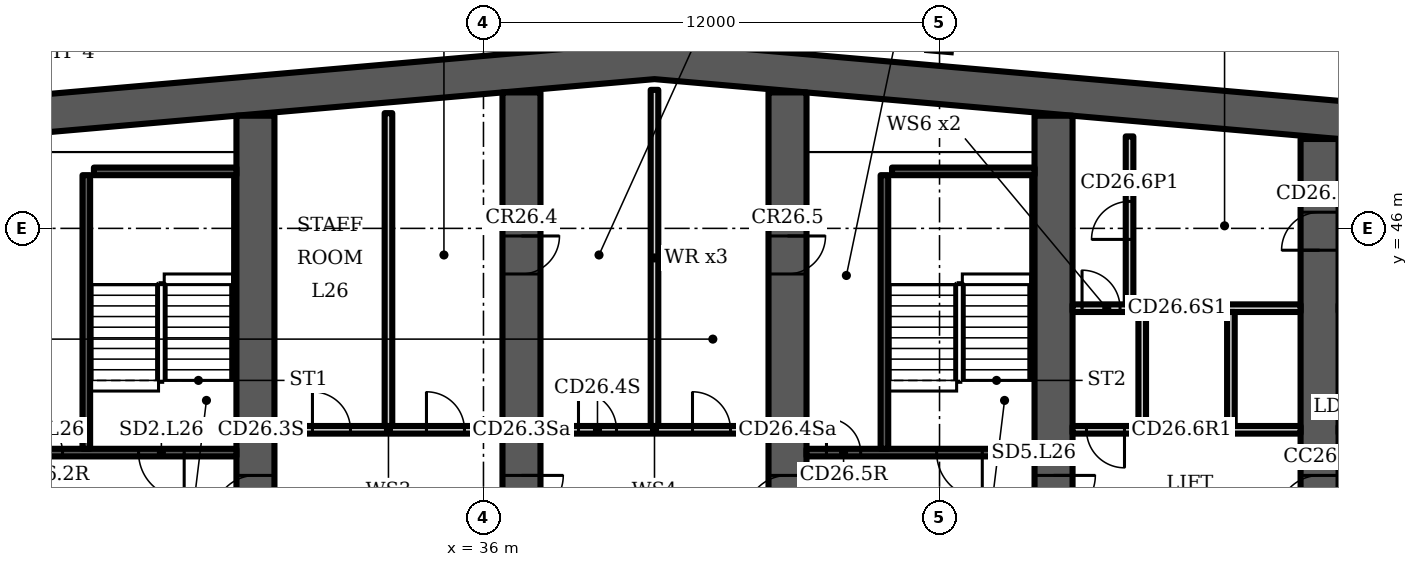
"""IFC4 building model, lengths in metres.
Left out: names, types, materials, properties, quantities, classifications, styles, units other than length and angle.
Written with IfcOpenShell. Run it as: python <this file> out.ifc"""

import sys

from ifc_helpers import new_model, si_unit, direction, frame, frame_2d, origin, origin_2d, place, context, subcontext, project, spatial, polyline, rectangle, i_section, outline, extrude, element, fill, save


model = new_model("IFC4")
c1 = context("Model", 3, precision=1e-05, world=origin(), true_north=direction((0.0, 1.0)))
c2 = subcontext(c1, "Body", "Model", "MODEL_VIEW")
j1 = project(units=[si_unit("LENGTHUNIT", "METRE"), si_unit("PLANEANGLEUNIT", "RADIAN")], contexts=[c1])
p1 = place(None, origin())
s1 = spatial("IfcSite", under=j1, at=p1, CompositionType="ELEMENT")
p2 = place(p1, origin())
s2 = spatial("IfcBuilding", under=s1, at=p2, CompositionType="ELEMENT")
p3 = place(p2, frame((0.0, 0.0, 114.7)))
s3 = spatial("IfcBuildingStorey", under=s2, at=p3, CompositionType="ELEMENT", Elevation=114.7)
p4 = place(p3, origin())
e1 = element("IfcWall", 1, at=p4, inside=s3, PredefinedType="SHEAR", context=c2, shape_type="SweptSolid", body=[
    extrude(outline(polyline([(16.0, 47.784), (40.5, 49.927), (65.0, 47.784), (65.0, 48.787), (40.5, 50.931), (16.0, 48.787), (16.0, 47.784)])), origin(), (0.0, 0.0, 1.0), 3.6),
])
p5 = place(p3, frame((30.0, 35.0, 0.0), z_axis=(0.0, 0.0, 1.0), x_axis=(0.0, 1.0, 0.0)))
e2 = element("IfcWall", 2, at=p5, inside=s3, PredefinedType="SHEAR", context=c2, shape_type="SweptSolid", body=[
    extrude(rectangle(XDim=13.965, YDim=1.0, at=frame_2d((6.982, 0.0))), origin(), (0.0, 0.0, 1.0), 3.6),
])
p6 = place(p5, frame((3.4, 0.0, 0.0)))
e3 = element("IfcOpeningElement", 3, at=p6, cuts=e2, PredefinedType="OPENING", context=c2, shape_type="SweptSolid", body=[
    extrude(rectangle(XDim=1.1, YDim=2.1, at=frame_2d((0.55, 1.05))), frame((0.0, 0.51, 0.0), z_axis=(0.0, -1.0, 0.0), x_axis=(1.0, 0.0, 0.0)), (0.0, 0.0, 1.0), 1.02),
])
p7 = place(p3, frame((37.0, 35.0, 0.0), z_axis=(0.0, 0.0, 1.0), x_axis=(0.0, 1.0, 0.0)))
e4 = element("IfcWall", 4, at=p7, inside=s3, PredefinedType="SHEAR", context=c2, shape_type="SweptSolid", body=[
    extrude(rectangle(XDim=14.577, YDim=1.0, at=frame_2d((7.289, 0.0))), origin(), (0.0, 0.0, 1.0), 3.6),
])
p8 = place(p7, frame((3.4, 0.0, 0.0)))
e5 = element("IfcOpeningElement", 5, at=p8, cuts=e4, PredefinedType="OPENING", context=c2, shape_type="SweptSolid", body=[
    extrude(rectangle(XDim=1.1, YDim=2.1, at=frame_2d((0.55, 1.05))), frame((0.0, 0.51, 0.0), z_axis=(0.0, -1.0, 0.0), x_axis=(1.0, 0.0, 0.0)), (0.0, 0.0, 1.0), 1.02),
])
p9 = place(p7, frame((9.8, 0.0, 0.0)))
e6 = element("IfcOpeningElement", 6, at=p9, cuts=e4, PredefinedType="OPENING", context=c2, shape_type="SweptSolid", body=[
    extrude(rectangle(XDim=1.0, YDim=2.1, at=frame_2d((0.5, 1.05))), frame((0.0, 0.51, 0.0), z_axis=(0.0, -1.0, 0.0), x_axis=(1.0, 0.0, 0.0)), (0.0, 0.0, 1.0), 1.02),
])
p10 = place(p3, frame((44.0, 35.0, 0.0), z_axis=(0.0, 0.0, 1.0), x_axis=(0.0, 1.0, 0.0)))
e7 = element("IfcWall", 7, at=p10, inside=s3, PredefinedType="SHEAR", context=c2, shape_type="SweptSolid", body=[
    extrude(rectangle(XDim=14.577, YDim=1.0, at=frame_2d((7.289, 0.0))), origin(), (0.0, 0.0, 1.0), 3.6),
])
p11 = place(p10, frame((3.4, 0.0, 0.0)))
e8 = element("IfcOpeningElement", 8, at=p11, cuts=e7, PredefinedType="OPENING", context=c2, shape_type="SweptSolid", body=[
    extrude(rectangle(XDim=1.1, YDim=2.1, at=frame_2d((0.55, 1.05))), frame((0.0, 0.51, 0.0), z_axis=(0.0, -1.0, 0.0), x_axis=(1.0, 0.0, 0.0)), (0.0, 0.0, 1.0), 1.02),
])
p12 = place(p10, frame((9.8, 0.0, 0.0)))
e9 = element("IfcOpeningElement", 9, at=p12, cuts=e7, PredefinedType="OPENING", context=c2, shape_type="SweptSolid", body=[
    extrude(rectangle(XDim=1.0, YDim=2.1, at=frame_2d((0.5, 1.05))), frame((0.0, 0.51, 0.0), z_axis=(0.0, -1.0, 0.0), x_axis=(1.0, 0.0, 0.0)), (0.0, 0.0, 1.0), 1.02),
])
p13 = place(p3, frame((51.0, 35.0, 0.0), z_axis=(0.0, 0.0, 1.0), x_axis=(0.0, 1.0, 0.0)))
e10 = element("IfcWall", 10, at=p13, inside=s3, PredefinedType="SHEAR", context=c2, shape_type="SweptSolid", body=[
    extrude(rectangle(XDim=13.965, YDim=1.0, at=frame_2d((6.982, 0.0))), origin(), (0.0, 0.0, 1.0), 3.6),
])
p14 = place(p13, frame((3.4, 0.0, 0.0)))
e11 = element("IfcOpeningElement", 11, at=p14, cuts=e10, PredefinedType="OPENING", context=c2, shape_type="SweptSolid", body=[
    extrude(rectangle(XDim=1.1, YDim=2.1, at=frame_2d((0.55, 1.05))), frame((0.0, 0.51, 0.0), z_axis=(0.0, -1.0, 0.0), x_axis=(1.0, 0.0, 0.0)), (0.0, 0.0, 1.0), 1.02),
])
p15 = place(p3, frame((58.0, 35.0, 0.0), z_axis=(0.0, 0.0, 1.0), x_axis=(0.0, 1.0, 0.0)))
e12 = element("IfcWall", 12, at=p15, inside=s3, PredefinedType="SHEAR", context=c2, shape_type="SweptSolid", body=[
    extrude(rectangle(XDim=13.352, YDim=1.0, at=frame_2d((6.676, 0.0))), origin(), (0.0, 0.0, 1.0), 3.6),
])
p16 = place(p15, frame((10.426, 0.0, 0.0)))
e13 = element("IfcOpeningElement", 13, at=p16, cuts=e12, PredefinedType="OPENING", context=c2, shape_type="SweptSolid", body=[
    extrude(rectangle(XDim=1.0, YDim=2.1, at=frame_2d((0.5, 1.05))), frame((0.0, 0.51, 0.0), z_axis=(0.0, -1.0, 0.0), x_axis=(1.0, 0.0, 0.0)), (0.0, 0.0, 1.0), 1.02),
])
p17 = place(p15, frame((3.4, 0.0, 0.0)))
e14 = element("IfcOpeningElement", 14, at=p17, cuts=e12, PredefinedType="OPENING", context=c2, shape_type="SweptSolid", body=[
    extrude(rectangle(XDim=1.1, YDim=2.1, at=frame_2d((0.55, 1.05))), frame((0.0, 0.51, 0.0), z_axis=(0.0, -1.0, 0.0), x_axis=(1.0, 0.0, 0.0)), (0.0, 0.0, 1.0), 1.02),
])
p18 = place(p3, frame((48.0, 50.815, 0.0), z_axis=(0.0, 0.0, 1.0), x_axis=(0.087156, 0.996198, 0.0)))
e15 = element("IfcColumn", 15, at=p18, inside=s3, PredefinedType="COLUMN", context=c2, shape_type="SweptSolid", body=[
    extrude(i_section(OverallWidth=0.305, OverallDepth=0.62, WebThickness=0.021, FlangeThickness=0.04, FilletRadius=0.027, at=origin_2d()), origin(), (0.0, 0.0, 1.0), 3.6),
])
p19 = place(p3, frame((23.5, 40.1, 0.0), z_axis=(0.0, 0.0, 1.0), x_axis=(1.0, 0.0, 0.0)))
e16 = element("IfcWall", 16, at=p19, inside=s3, PredefinedType="SHEAR", context=c2, shape_type="SweptSolid", body=[
    extrude(rectangle(XDim=6.0, YDim=0.2, at=frame_2d((3.0, 0.0))), origin(), (0.0, 0.0, 1.0), 3.2),
])
p20 = place(p19, frame((3.425, 0.0, 0.0)))
e17 = element("IfcOpeningElement", 17, at=p20, cuts=e16, PredefinedType="OPENING", context=c2, shape_type="SweptSolid", body=[
    extrude(rectangle(XDim=1.2, YDim=2.1, at=frame_2d((0.6, 1.05))), frame((0.0, 0.11, 0.0), z_axis=(0.0, -1.0, 0.0), x_axis=(1.0, 0.0, 0.0)), (0.0, 0.0, 1.0), 0.22),
])
p21 = place(p19, frame((0.525, 0.0, 0.0)))
e18 = element("IfcOpeningElement", 18, at=p21, cuts=e16, PredefinedType="OPENING", context=c2, shape_type="SweptSolid", body=[
    extrude(rectangle(XDim=0.9, YDim=2.1, at=frame_2d((0.45, 1.05))), frame((0.0, 0.11, 0.0), z_axis=(0.0, -1.0, 0.0), x_axis=(1.0, 0.0, 0.0)), (0.0, 0.0, 1.0), 0.22),
])
p22 = place(p3, frame((25.55, 40.2, 0.0), z_axis=(0.0, 0.0, 1.0), x_axis=(0.0, 1.0, 0.0)))
e19 = element("IfcWall", 19, at=p22, inside=s3, PredefinedType="SHEAR", context=c2, shape_type="SweptSolid", body=[
    extrude(rectangle(XDim=7.2, YDim=0.2, at=frame_2d((3.6, 0.0))), origin(), (0.0, 0.0, 1.0), 3.2),
])
p23 = place(p3, frame((25.75, 47.5, 0.0), z_axis=(0.0, 0.0, 1.0), x_axis=(1.0, 0.0, 0.0)))
e20 = element("IfcWall", 20, at=p23, inside=s3, PredefinedType="SHEAR", context=c2, shape_type="SweptSolid", body=[
    extrude(rectangle(XDim=3.75, YDim=0.2, at=frame_2d((1.875, 0.0))), origin(), (0.0, 0.0, 1.0), 3.2),
])
p24 = place(p3, frame((30.5, 40.7, 0.0), z_axis=(0.0, 0.0, 1.0), x_axis=(1.0, 0.0, 0.0)))
e21 = element("IfcWall", 21, at=p24, inside=s3, PredefinedType="PARTITIONING", context=c2, shape_type="SweptSolid", body=[
    extrude(rectangle(XDim=6.0, YDim=0.2, at=frame_2d((3.0, 0.0))), origin(), (0.0, 0.0, 1.0), 3.2),
])
p25 = place(p24, frame((1.0, 0.0, 0.0)))
e22 = element("IfcOpeningElement", 22, at=p25, cuts=e21, PredefinedType="OPENING", context=c2, shape_type="SweptSolid", body=[
    extrude(rectangle(XDim=1.0, YDim=2.1, at=frame_2d((0.5, 1.05))), frame((0.0, 0.11, 0.0), z_axis=(0.0, -1.0, 0.0), x_axis=(1.0, 0.0, 0.0)), (0.0, 0.0, 1.0), 0.22),
])
p26 = place(p24, frame((4.0, 0.0, 0.0)))
e23 = element("IfcOpeningElement", 23, at=p26, cuts=e21, PredefinedType="OPENING", context=c2, shape_type="SweptSolid", body=[
    extrude(rectangle(XDim=1.0, YDim=2.1, at=frame_2d((0.5, 1.05))), frame((0.0, 0.11, 0.0), z_axis=(0.0, -1.0, 0.0), x_axis=(1.0, 0.0, 0.0)), (0.0, 0.0, 1.0), 0.22),
])
p27 = place(p3, frame((33.5, 40.8, 0.0), z_axis=(0.0, 0.0, 1.0), x_axis=(0.0, 1.0, 0.0)))
e24 = element("IfcWall", 24, at=p27, inside=s3, PredefinedType="PARTITIONING", context=c2, shape_type="SweptSolid", body=[
    extrude(rectangle(XDim=8.232, YDim=0.2, at=frame_2d((4.116, 0.0))), origin(), (0.0, 0.0, 1.0), 3.2),
])
p28 = place(p3, frame((37.5, 40.7, 0.0), z_axis=(0.0, 0.0, 1.0), x_axis=(1.0, 0.0, 0.0)))
e25 = element("IfcWall", 25, at=p28, inside=s3, PredefinedType="PARTITIONING", context=c2, shape_type="SweptSolid", body=[
    extrude(rectangle(XDim=6.0, YDim=0.2, at=frame_2d((3.0, 0.0))), origin(), (0.0, 0.0, 1.0), 3.2),
])
p29 = place(p28, frame((1.0, 0.0, 0.0)))
e26 = element("IfcOpeningElement", 26, at=p29, cuts=e25, PredefinedType="OPENING", context=c2, shape_type="SweptSolid", body=[
    extrude(rectangle(XDim=1.0, YDim=2.1, at=frame_2d((0.5, 1.05))), frame((0.0, 0.11, 0.0), z_axis=(0.0, -1.0, 0.0), x_axis=(1.0, 0.0, 0.0)), (0.0, 0.0, 1.0), 0.22),
])
p30 = place(p28, frame((4.0, 0.0, 0.0)))
e27 = element("IfcOpeningElement", 27, at=p30, cuts=e25, PredefinedType="OPENING", context=c2, shape_type="SweptSolid", body=[
    extrude(rectangle(XDim=1.0, YDim=2.1, at=frame_2d((0.5, 1.05))), frame((0.0, 0.11, 0.0), z_axis=(0.0, -1.0, 0.0), x_axis=(1.0, 0.0, 0.0)), (0.0, 0.0, 1.0), 0.22),
])
p31 = place(p3, frame((40.5, 40.8, 0.0), z_axis=(0.0, 0.0, 1.0), x_axis=(0.0, 1.0, 0.0)))
e28 = element("IfcWall", 28, at=p31, inside=s3, PredefinedType="PARTITIONING", context=c2, shape_type="SweptSolid", body=[
    extrude(rectangle(XDim=8.844, YDim=0.2, at=frame_2d((4.422, 0.0))), origin(), (0.0, 0.0, 1.0), 3.2),
])
p32 = place(p3, frame((44.5, 40.1, 0.0), z_axis=(0.0, 0.0, 1.0), x_axis=(1.0, 0.0, 0.0)))
e29 = element("IfcWall", 29, at=p32, inside=s3, PredefinedType="SHEAR", context=c2, shape_type="SweptSolid", body=[
    extrude(rectangle(XDim=6.0, YDim=0.2, at=frame_2d((3.0, 0.0))), origin(), (0.0, 0.0, 1.0), 3.2),
])
p33 = place(p32, frame((3.425, 0.0, 0.0)))
e30 = element("IfcOpeningElement", 30, at=p33, cuts=e29, PredefinedType="OPENING", context=c2, shape_type="SweptSolid", body=[
    extrude(rectangle(XDim=1.2, YDim=2.1, at=frame_2d((0.6, 1.05))), frame((0.0, 0.11, 0.0), z_axis=(0.0, -1.0, 0.0), x_axis=(1.0, 0.0, 0.0)), (0.0, 0.0, 1.0), 0.22),
])
p34 = place(p32, frame((0.525, 0.0, 0.0)))
e31 = element("IfcOpeningElement", 31, at=p34, cuts=e29, PredefinedType="OPENING", context=c2, shape_type="SweptSolid", body=[
    extrude(rectangle(XDim=0.9, YDim=2.1, at=frame_2d((0.45, 1.05))), frame((0.0, 0.11, 0.0), z_axis=(0.0, -1.0, 0.0), x_axis=(1.0, 0.0, 0.0)), (0.0, 0.0, 1.0), 0.22),
])
p35 = place(p3, frame((46.55, 40.2, 0.0), z_axis=(0.0, 0.0, 1.0), x_axis=(0.0, 1.0, 0.0)))
e32 = element("IfcWall", 32, at=p35, inside=s3, PredefinedType="SHEAR", context=c2, shape_type="SweptSolid", body=[
    extrude(rectangle(XDim=7.2, YDim=0.2, at=frame_2d((3.6, 0.0))), origin(), (0.0, 0.0, 1.0), 3.2),
])
p36 = place(p3, frame((46.75, 47.5, 0.0), z_axis=(0.0, 0.0, 1.0), x_axis=(1.0, 0.0, 0.0)))
e33 = element("IfcWall", 33, at=p36, inside=s3, PredefinedType="SHEAR", context=c2, shape_type="SweptSolid", body=[
    extrude(rectangle(XDim=3.75, YDim=0.2, at=frame_2d((1.875, 0.0))), origin(), (0.0, 0.0, 1.0), 3.2),
])
p37 = place(p3, frame((51.5, 40.7, 0.0), z_axis=(0.0, 0.0, 1.0), x_axis=(1.0, 0.0, 0.0)))
e34 = element("IfcWall", 34, at=p37, inside=s3, PredefinedType="PARTITIONING", context=c2, shape_type="SweptSolid", body=[
    extrude(rectangle(XDim=6.0, YDim=0.2, at=frame_2d((3.0, 0.0))), origin(), (0.0, 0.0, 1.0), 3.2),
])
p38 = place(p37, frame((0.367, 0.0, 0.0)))
e35 = element("IfcOpeningElement", 35, at=p38, cuts=e34, PredefinedType="OPENING", context=c2, shape_type="SweptSolid", body=[
    extrude(rectangle(XDim=1.0, YDim=2.1, at=frame_2d((0.5, 1.05))), frame((0.0, 0.11, 0.0), z_axis=(0.0, -1.0, 0.0), x_axis=(1.0, 0.0, 0.0)), (0.0, 0.0, 1.0), 0.22),
])
p39 = place(p3, frame((51.5, 43.9, 0.0), z_axis=(0.0, 0.0, 1.0), x_axis=(1.0, 0.0, 0.0)))
e36 = element("IfcWall", 36, at=p39, inside=s3, PredefinedType="PARTITIONING", context=c2, shape_type="SweptSolid", body=[
    extrude(rectangle(XDim=6.0, YDim=0.2, at=frame_2d((3.0, 0.0))), origin(), (0.0, 0.0, 1.0), 3.2),
])
p40 = place(p39, frame((0.25, 0.0, 0.0)))
e37 = element("IfcOpeningElement", 37, at=p40, cuts=e36, PredefinedType="OPENING", context=c2, shape_type="SweptSolid", body=[
    extrude(rectangle(XDim=1.0, YDim=2.1, at=frame_2d((0.5, 1.05))), frame((0.0, 0.11, 0.0), z_axis=(0.0, -1.0, 0.0), x_axis=(1.0, 0.0, 0.0)), (0.0, 0.0, 1.0), 0.22),
])
p41 = place(p3, frame((0.0, 0.0, -0.0)))
e38 = element("IfcWall", 38, at=p41, inside=s3, PredefinedType="PARTITIONING", context=c2, shape_type="SweptSolid", body=[
    extrude(outline(polyline([(53.233, 40.8), (53.233, 43.8), (53.433, 43.8), (53.433, 40.8), (53.233, 40.8)])), origin(), (0.0, 0.0, 1.0), 3.2),
])
p42 = place(p3, frame((0.0, 0.0, -0.0)))
e39 = element("IfcWall", 39, at=p42, inside=s3, PredefinedType="PARTITIONING", context=c2, shape_type="SweptSolid", body=[
    extrude(outline(polyline([(55.567, 40.8), (55.567, 43.8), (55.767, 43.8), (55.767, 40.8), (55.567, 40.8)])), origin(), (0.0, 0.0, 1.0), 3.2),
])
p43 = place(p3, frame((53.0, 44.0, 0.0), z_axis=(0.0, 0.0, 1.0), x_axis=(0.0, 1.0, 0.0)))
e40 = element("IfcWall", 40, at=p43, inside=s3, PredefinedType="PARTITIONING", context=c2, shape_type="SweptSolid", body=[
    extrude(rectangle(XDim=4.42, YDim=0.2, at=frame_2d((2.21, 0.0))), origin(), (0.0, 0.0, 1.0), 3.2),
])
p44 = place(p43, frame((1.71, 0.0, 0.0)))
e41 = element("IfcOpeningElement", 41, at=p44, cuts=e40, PredefinedType="OPENING", context=c2, shape_type="SweptSolid", body=[
    extrude(rectangle(XDim=1.0, YDim=2.1, at=frame_2d((0.5, 1.05))), frame((0.0, 0.11, 0.0), z_axis=(0.0, -1.0, 0.0), x_axis=(1.0, 0.0, 0.0)), (0.0, 0.0, 1.0), 0.22),
])
p45 = place(p20, origin())
e42 = element("IfcDoor", 42, at=p45, inside=s3, OperationType="SINGLE_SWING_RIGHT", PredefinedType="DOOR", context=c2, shape_type="SweptSolid", body=[
    extrude(rectangle(XDim=1.2, YDim=2.1, at=frame_2d((0.6, 1.05))), frame((0.0, 0.025, 0.0), z_axis=(0.0, -1.0, 0.0), x_axis=(1.0, 0.0, 0.0)), (0.0, 0.0, 1.0), 0.05),
])
fill(e17, e42)
p46 = place(p21, origin())
e43 = element("IfcDoor", 43, at=p46, inside=s3, OperationType="SINGLE_SWING_LEFT", PredefinedType="DOOR", context=c2, shape_type="SweptSolid", body=[
    extrude(rectangle(XDim=0.9, YDim=2.1, at=frame_2d((0.45, 1.05))), frame((0.0, 0.025, 0.0), z_axis=(0.0, -1.0, 0.0), x_axis=(1.0, 0.0, 0.0)), (0.0, 0.0, 1.0), 0.05),
])
fill(e18, e43)
p47 = place(p25, origin())
e44 = element("IfcDoor", 44, at=p47, inside=s3, OperationType="SINGLE_SWING_LEFT", PredefinedType="DOOR", context=c2, shape_type="SweptSolid", body=[
    extrude(rectangle(XDim=1.0, YDim=2.1, at=frame_2d((0.5, 1.05))), frame((0.0, 0.025, 0.0), z_axis=(0.0, -1.0, 0.0), x_axis=(1.0, 0.0, 0.0)), (0.0, 0.0, 1.0), 0.05),
])
fill(e22, e44)
p48 = place(p26, origin())
e45 = element("IfcDoor", 45, at=p48, inside=s3, OperationType="SINGLE_SWING_LEFT", PredefinedType="DOOR", context=c2, shape_type="SweptSolid", body=[
    extrude(rectangle(XDim=1.0, YDim=2.1, at=frame_2d((0.5, 1.05))), frame((0.0, 0.025, 0.0), z_axis=(0.0, -1.0, 0.0), x_axis=(1.0, 0.0, 0.0)), (0.0, 0.0, 1.0), 0.05),
])
fill(e23, e45)
p49 = place(p29, origin())
e46 = element("IfcDoor", 46, at=p49, inside=s3, OperationType="SINGLE_SWING_LEFT", PredefinedType="DOOR", context=c2, shape_type="SweptSolid", body=[
    extrude(rectangle(XDim=1.0, YDim=2.1, at=frame_2d((0.5, 1.05))), frame((0.0, 0.025, 0.0), z_axis=(0.0, -1.0, 0.0), x_axis=(1.0, 0.0, 0.0)), (0.0, 0.0, 1.0), 0.05),
])
fill(e26, e46)
p50 = place(p30, origin())
e47 = element("IfcDoor", 47, at=p50, inside=s3, OperationType="SINGLE_SWING_LEFT", PredefinedType="DOOR", context=c2, shape_type="SweptSolid", body=[
    extrude(rectangle(XDim=1.0, YDim=2.1, at=frame_2d((0.5, 1.05))), frame((0.0, 0.025, 0.0), z_axis=(0.0, -1.0, 0.0), x_axis=(1.0, 0.0, 0.0)), (0.0, 0.0, 1.0), 0.05),
])
fill(e27, e47)
p51 = place(p33, origin())
e48 = element("IfcDoor", 48, at=p51, inside=s3, OperationType="SINGLE_SWING_RIGHT", PredefinedType="DOOR", context=c2, shape_type="SweptSolid", body=[
    extrude(rectangle(XDim=1.2, YDim=2.1, at=frame_2d((0.6, 1.05))), frame((0.0, 0.025, 0.0), z_axis=(0.0, -1.0, 0.0), x_axis=(1.0, 0.0, 0.0)), (0.0, 0.0, 1.0), 0.05),
])
fill(e30, e48)
p52 = place(p34, origin())
e49 = element("IfcDoor", 49, at=p52, inside=s3, OperationType="SINGLE_SWING_LEFT", PredefinedType="DOOR", context=c2, shape_type="SweptSolid", body=[
    extrude(rectangle(XDim=0.9, YDim=2.1, at=frame_2d((0.45, 1.05))), frame((0.0, 0.025, 0.0), z_axis=(0.0, -1.0, 0.0), x_axis=(1.0, 0.0, 0.0)), (0.0, 0.0, 1.0), 0.05),
])
fill(e31, e49)
p53 = place(p38, origin())
e50 = element("IfcDoor", 50, at=p53, inside=s3, OperationType="SINGLE_SWING_RIGHT", PredefinedType="DOOR", context=c2, shape_type="SweptSolid", body=[
    extrude(rectangle(XDim=1.0, YDim=2.1, at=frame_2d((0.5, 1.05))), frame((0.0, 0.025, 0.0), z_axis=(0.0, -1.0, 0.0), x_axis=(1.0, 0.0, 0.0)), (0.0, 0.0, 1.0), 0.05),
])
fill(e35, e50)
p54 = place(p40, origin())
e51 = element("IfcDoor", 51, at=p54, inside=s3, OperationType="SINGLE_SWING_LEFT", PredefinedType="DOOR", context=c2, shape_type="SweptSolid", body=[
    extrude(rectangle(XDim=1.0, YDim=2.1, at=frame_2d((0.5, 1.05))), frame((0.0, 0.025, 0.0), z_axis=(0.0, -1.0, 0.0), x_axis=(1.0, 0.0, 0.0)), (0.0, 0.0, 1.0), 0.05),
])
fill(e37, e51)
p55 = place(p44, origin())
e52 = element("IfcDoor", 52, at=p55, inside=s3, OperationType="SINGLE_SWING_LEFT", PredefinedType="DOOR", context=c2, shape_type="SweptSolid", body=[
    extrude(rectangle(XDim=1.0, YDim=2.1, at=frame_2d((0.5, 1.05))), frame((0.0, 0.025, 0.0), z_axis=(0.0, -1.0, 0.0), x_axis=(1.0, 0.0, 0.0)), (0.0, 0.0, 1.0), 0.05),
])
fill(e41, e52)
p56 = place(p16, origin())
e53 = element("IfcDoor", 53, at=p56, inside=s3, OperationType="SINGLE_SWING_LEFT", PredefinedType="DOOR", context=c2, shape_type="SweptSolid", body=[
    extrude(rectangle(XDim=1.0, YDim=2.1, at=frame_2d((0.5, 1.05))), frame((0.0, 0.5, 0.0), z_axis=(0.0, -1.0, 0.0), x_axis=(1.0, 0.0, 0.0)), (0.0, 0.0, 1.0), 1.0),
])
fill(e13, e53)
p57 = place(p6, origin())
e54 = element("IfcDoor", 54, at=p57, inside=s3, OperationType="SINGLE_SWING_LEFT", PredefinedType="DOOR", context=c2, shape_type="SweptSolid", body=[
    extrude(rectangle(XDim=1.1, YDim=2.1, at=frame_2d((0.55, 1.05))), frame((0.0, 0.025, 0.0), z_axis=(0.0, -1.0, 0.0), x_axis=(1.0, 0.0, 0.0)), (0.0, 0.0, 1.0), 0.05),
])
fill(e3, e54)
p58 = place(p8, origin())
e55 = element("IfcDoor", 55, at=p58, inside=s3, OperationType="SINGLE_SWING_RIGHT", PredefinedType="DOOR", context=c2, shape_type="SweptSolid", body=[
    extrude(rectangle(XDim=1.1, YDim=2.1, at=frame_2d((0.55, 1.05))), frame((0.0, 0.025, 0.0), z_axis=(0.0, -1.0, 0.0), x_axis=(1.0, 0.0, 0.0)), (0.0, 0.0, 1.0), 0.05),
])
fill(e5, e55)
p59 = place(p9, origin())
e56 = element("IfcDoor", 56, at=p59, inside=s3, OperationType="SINGLE_SWING_RIGHT", PredefinedType="DOOR", context=c2, shape_type="SweptSolid", body=[
    extrude(rectangle(XDim=1.0, YDim=2.1, at=frame_2d((0.5, 1.05))), frame((0.0, 0.5, 0.0), z_axis=(0.0, -1.0, 0.0), x_axis=(1.0, 0.0, 0.0)), (0.0, 0.0, 1.0), 1.0),
])
fill(e6, e56)
p60 = place(p11, origin())
e57 = element("IfcDoor", 57, at=p60, inside=s3, OperationType="SINGLE_SWING_LEFT", PredefinedType="DOOR", context=c2, shape_type="SweptSolid", body=[
    extrude(rectangle(XDim=1.1, YDim=2.1, at=frame_2d((0.55, 1.05))), frame((0.0, 0.025, 0.0), z_axis=(0.0, -1.0, 0.0), x_axis=(1.0, 0.0, 0.0)), (0.0, 0.0, 1.0), 0.05),
])
fill(e8, e57)
p61 = place(p12, origin())
e58 = element("IfcDoor", 58, at=p61, inside=s3, OperationType="SINGLE_SWING_RIGHT", PredefinedType="DOOR", context=c2, shape_type="SweptSolid", body=[
    extrude(rectangle(XDim=1.0, YDim=2.1, at=frame_2d((0.5, 1.05))), frame((0.0, 0.5, 0.0), z_axis=(0.0, -1.0, 0.0), x_axis=(1.0, 0.0, 0.0)), (0.0, 0.0, 1.0), 1.0),
])
fill(e9, e58)
p62 = place(p14, origin())
e59 = element("IfcDoor", 59, at=p62, inside=s3, OperationType="SINGLE_SWING_RIGHT", PredefinedType="DOOR", context=c2, shape_type="SweptSolid", body=[
    extrude(rectangle(XDim=1.1, YDim=2.1, at=frame_2d((0.55, 1.05))), frame((0.0, 0.025, 0.0), z_axis=(0.0, -1.0, 0.0), x_axis=(1.0, 0.0, 0.0)), (0.0, 0.0, 1.0), 0.05),
])
fill(e11, e59)
p63 = place(p17, origin())
e60 = element("IfcDoor", 60, at=p63, inside=s3, OperationType="SINGLE_SWING_LEFT", PredefinedType="DOOR", context=c2, shape_type="SweptSolid", body=[
    extrude(rectangle(XDim=1.1, YDim=2.1, at=frame_2d((0.55, 1.05))), frame((0.0, 0.025, 0.0), z_axis=(0.0, -1.0, 0.0), x_axis=(1.0, 0.0, 0.0)), (0.0, 0.0, 1.0), 0.05),
])
fill(e14, e60)
save(model, sys.argv[1])
